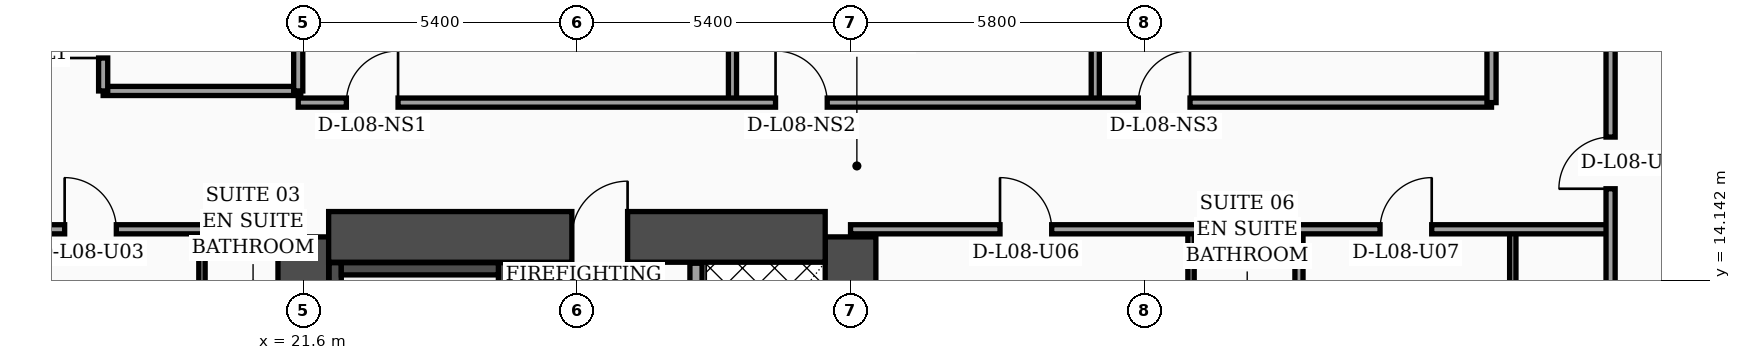
"""IFC4 building model, lengths in metres.
Left out: names, types, materials, properties, quantities, classifications, styles, units other than length and angle.
Written with IfcOpenShell. Run it as: python <this file> out.ifc"""

import sys

from ifc_helpers import new_model, si_unit, direction, frame, frame_2d, origin, place, context, subcontext, project, spatial, rectangle, extrude, element, fill, save


model = new_model("IFC4")
c1 = context("Model", 3, precision=1e-05, world=origin(), true_north=direction((0.0, 1.0)))
c2 = subcontext(c1, "Body", "Model", "MODEL_VIEW")
j1 = project(units=[si_unit("LENGTHUNIT", "METRE"), si_unit("PLANEANGLEUNIT", "RADIAN")], contexts=[c1])
p1 = place(None, origin())
s1 = spatial("IfcSite", under=j1, at=p1, CompositionType="ELEMENT")
p2 = place(p1, origin())
s2 = spatial("IfcBuilding", under=s1, at=p2, CompositionType="ELEMENT")
p3 = place(p2, frame((0.0, 0.0, 38.4)))
s3 = spatial("IfcBuildingStorey", under=s2, at=p3, CompositionType="ELEMENT", Elevation=38.4)
for number, where, z_axis, x_axis in (
    (1, (21.6, 4.6, 0.0), (0.0, 0.0, 1.0), (0.0, 1.0, 0.0)),
    (2, (32.4, 4.6, 0.0), (0.0, 0.0, 1.0), (0.0, 1.0, 0.0)),
):
    element("IfcWall", number, at=place(p3, frame(where, z_axis=z_axis, x_axis=x_axis)), inside=s3, PredefinedType="SHEAR", context=c2, shape_type="SweptSolid", body=[
        extrude(rectangle(XDim=10.4, YDim=1.0, at=frame_2d((5.2, 0.0))), origin(), (0.0, 0.0, 1.0), 3.56),
    ])
p4 = place(p3, frame((22.1, 15.0, 0.0), z_axis=(0.0, 0.0, 1.0), x_axis=(1.0, 0.0, 0.0)))
e3 = element("IfcWall", 3, at=p4, inside=s3, PredefinedType="SHEAR", context=c2, shape_type="SweptSolid", body=[
    extrude(rectangle(XDim=9.8, YDim=1.0, at=frame_2d((4.9, 0.0))), origin(), (0.0, 0.0, 1.0), 3.56),
])
p5 = place(p4, frame((4.8, 0.0, 0.0)))
e4 = element("IfcOpeningElement", 4, at=p5, cuts=e3, PredefinedType="OPENING", context=c2, shape_type="SweptSolid", body=[
    extrude(rectangle(XDim=1.1, YDim=2.2, at=frame_2d((0.55, 1.1))), frame((0.0, 0.51, 0.0), z_axis=(0.0, -1.0, 0.0), x_axis=(1.0, 0.0, 0.0)), (0.0, 0.0, 1.0), 1.02),
])
p6 = place(p3, frame((22.23, 5.1, 0.0), z_axis=(0.0, 0.0, 1.0), x_axis=(0.0, 1.0, 0.0)))
e5 = element("IfcWall", 5, at=p6, inside=s3, PredefinedType="SOLIDWALL", context=c2, shape_type="SweptSolid", body=[
    extrude(rectangle(XDim=9.39, YDim=0.24, at=frame_2d((4.695, 0.0))), origin(), (0.0, 0.0, 1.0), 3.56),
])
p7 = place(p3, frame((25.57, 5.1, 0.0), z_axis=(0.0, 0.0, 1.0), x_axis=(0.0, 1.0, 0.0)))
e6 = element("IfcWall", 6, at=p7, inside=s3, PredefinedType="SOLIDWALL", context=c2, shape_type="SweptSolid", body=[
    extrude(rectangle(XDim=9.39, YDim=0.24, at=frame_2d((4.695, 0.0))), origin(), (0.0, 0.0, 1.0), 3.56),
])
p8 = place(p7, frame((0.35, 0.0, 0.0)))
e7 = element("IfcOpeningElement", 7, at=p8, cuts=e6, PredefinedType="OPENING", context=c2, shape_type="SweptSolid", body=[
    extrude(rectangle(XDim=1.15, YDim=2.2, at=frame_2d((0.575, 1.1))), frame((0.0, 0.13, 0.0), z_axis=(0.0, -1.0, 0.0), x_axis=(1.0, 0.0, 0.0)), (0.0, 0.0, 1.0), 0.26),
])
p9 = place(p3, frame((22.35, 14.37, 0.0), z_axis=(0.0, 0.0, 1.0), x_axis=(1.0, 0.0, 0.0)))
e8 = element("IfcWall", 8, at=p9, inside=s3, PredefinedType="SOLIDWALL", context=c2, shape_type="SweptSolid", body=[
    extrude(rectangle(XDim=3.1, YDim=0.24, at=frame_2d((1.55, 0.0))), origin(), (0.0, 0.0, 1.0), 3.56),
])
p10 = place(p3, frame((29.35, 5.12, 0.0), z_axis=(0.0, 0.0, 1.0), x_axis=(0.0, 1.0, 0.0)))
e9 = element("IfcWall", 9, at=p10, inside=s3, PredefinedType="SOLIDWALL", context=c2, shape_type="SweptSolid", body=[
    extrude(rectangle(XDim=9.36, YDim=0.24, at=frame_2d((4.68, 0.0))), origin(), (0.0, 0.0, 1.0), 3.56),
])
p11 = place(p10, frame((0.55, 0.0, 0.0)))
e10 = element("IfcOpeningElement", 10, at=p11, cuts=e9, PredefinedType="OPENING", context=c2, shape_type="SweptSolid", body=[
    extrude(rectangle(XDim=1.3, YDim=2.35, at=frame_2d((0.65, 1.175))), frame((0.0, 0.13, 0.0), z_axis=(0.0, -1.0, 0.0), x_axis=(1.0, 0.0, 0.0)), (0.0, 0.0, 1.0), 0.26),
])
p12 = place(p3, frame((19.6, 2.44, 0.0), z_axis=(0.0, 0.0, 1.0), x_axis=(0.0, 1.0, 0.0)))
e11 = element("IfcWall", 11, at=p12, inside=s3, PredefinedType="PARTITIONING", context=c2, shape_type="SweptSolid", body=[
    extrude(rectangle(XDim=12.71, YDim=0.125, at=frame_2d((6.355, 0.0))), origin(), (0.0, 0.0, 1.0), 2.34),
])
p13 = place(p12, frame((4.34, 0.0, 0.0)))
e12 = element("IfcOpeningElement", 12, at=p13, cuts=e11, PredefinedType="OPENING", context=c2, shape_type="SweptSolid", body=[
    extrude(rectangle(XDim=0.96, YDim=2.2, at=frame_2d((0.48, 1.1))), frame((0.0, 0.073, 0.0), z_axis=(0.0, -1.0, 0.0), x_axis=(1.0, 0.0, 0.0)), (0.0, 0.0, 1.0), 0.145),
])
p14 = place(p12, frame((10.18, 0.0, 0.0)))
e13 = element("IfcOpeningElement", 13, at=p14, cuts=e11, PredefinedType="OPENING", context=c2, shape_type="SweptSolid", body=[
    extrude(rectangle(XDim=0.9, YDim=2.15, at=frame_2d((0.45, 1.075))), frame((0.0, 0.073, 0.0), z_axis=(0.0, -1.0, 0.0), x_axis=(1.0, 0.0, 0.0)), (0.0, 0.0, 1.0), 0.145),
])
p15 = place(p3, frame((15.15, 15.15, 0.0), z_axis=(0.0, 0.0, 1.0), x_axis=(1.0, 0.0, 0.0)))
e14 = element("IfcWall", 14, at=p15, inside=s3, PredefinedType="PARTITIONING", context=c2, shape_type="SweptSolid", body=[
    extrude(rectangle(XDim=6.45, YDim=0.18, at=frame_2d((3.225, 0.0))), origin(), (0.0, 0.0, 1.0), 2.34),
])
p16 = place(p15, frame((1.74, 0.0, 0.0)))
e15 = element("IfcOpeningElement", 15, at=p16, cuts=e14, PredefinedType="OPENING", context=c2, shape_type="SweptSolid", body=[
    extrude(rectangle(XDim=1.02, YDim=2.2, at=frame_2d((0.51, 1.1))), frame((0.0, 0.1, 0.0), z_axis=(0.0, -1.0, 0.0), x_axis=(1.0, 0.0, 0.0)), (0.0, 0.0, 1.0), 0.2),
])
p17 = place(p3, frame((17.65, 17.88, 0.0), z_axis=(0.0, 0.0, 1.0), x_axis=(1.0, 0.0, 0.0)))
e16 = element("IfcWall", 16, at=p17, inside=s3, PredefinedType="PARTITIONING", context=c2, shape_type="SweptSolid", body=[
    extrude(rectangle(XDim=3.9, YDim=0.18, at=frame_2d((1.95, 0.0))), origin(), (0.0, 0.0, 1.0), 3.56),
])
p18 = place(p3, frame((21.5, 17.88, 0.0), z_axis=(0.0, 0.0, 1.0), x_axis=(0.0, 1.0, 0.0)))
e17 = element("IfcWall", 17, at=p18, inside=s3, PredefinedType="PARTITIONING", context=c2, shape_type="SweptSolid", body=[
    extrude(rectangle(XDim=6.44, YDim=0.18, at=frame_2d((3.22, 0.0))), origin(), (0.0, 0.0, 1.0), 3.09),
])
p19 = place(p3, frame((17.65, 17.88, 0.0), z_axis=(0.0, 0.0, 1.0), x_axis=(0.0, 1.0, 0.0)))
e18 = element("IfcWall", 18, at=p19, inside=s3, PredefinedType="PARTITIONING", context=c2, shape_type="SweptSolid", body=[
    extrude(rectangle(XDim=6.44, YDim=0.18, at=frame_2d((3.22, 0.0))), origin(), (0.0, 0.0, 1.0), 3.09),
])
p20 = place(p19, frame((0.65, 0.0, 0.0)))
e19 = element("IfcOpeningElement", 19, at=p20, cuts=e18, PredefinedType="OPENING", context=c2, shape_type="SweptSolid", body=[
    extrude(rectangle(XDim=0.98, YDim=2.15, at=frame_2d((0.49, 1.075))), frame((0.0, 0.1, 0.0), z_axis=(0.0, -1.0, 0.0), x_axis=(1.0, 0.0, 0.0)), (0.0, 0.0, 1.0), 0.2),
])
p21 = place(p19, frame((3.97, 0.0, 0.0)))
e20 = element("IfcOpeningElement", 20, at=p21, cuts=e18, PredefinedType="OPENING", context=c2, shape_type="SweptSolid", body=[
    extrude(rectangle(XDim=0.96, YDim=2.2, at=frame_2d((0.48, 1.1))), frame((0.0, 0.1, 0.0), z_axis=(0.0, -1.0, 0.0), x_axis=(1.0, 0.0, 0.0)), (0.0, 0.0, 1.0), 0.2),
])
p22 = place(p3, frame((39.12, 2.44, 0.0), z_axis=(0.0, 0.0, 1.0), x_axis=(0.0, 1.0, 0.0)))
e21 = element("IfcWall", 21, at=p22, inside=s3, PredefinedType="PARTITIONING", context=c2, shape_type="SweptSolid", body=[
    extrude(rectangle(XDim=12.71, YDim=0.125, at=frame_2d((6.355, 0.0))), origin(), (0.0, 0.0, 1.0), 2.84),
])
p23 = place(p22, frame((4.35, 0.0, 0.0)))
e22 = element("IfcOpeningElement", 22, at=p23, cuts=e21, PredefinedType="OPENING", context=c2, shape_type="SweptSolid", body=[
    extrude(rectangle(XDim=0.96, YDim=2.2, at=frame_2d((0.48, 1.1))), frame((0.0, 0.073, 0.0), z_axis=(0.0, -1.0, 0.0), x_axis=(1.0, 0.0, 0.0)), (0.0, 0.0, 1.0), 0.145),
])
p24 = place(p22, frame((10.21, 0.0, 0.0)))
e23 = element("IfcOpeningElement", 23, at=p24, cuts=e21, PredefinedType="OPENING", context=c2, shape_type="SweptSolid", body=[
    extrude(rectangle(XDim=0.9, YDim=2.15, at=frame_2d((0.45, 1.075))), frame((0.0, 0.073, 0.0), z_axis=(0.0, -1.0, 0.0), x_axis=(1.0, 0.0, 0.0)), (0.0, 0.0, 1.0), 0.145),
])
p25 = place(p3, frame((45.47, 2.44, 0.0), z_axis=(0.0, 0.0, 1.0), x_axis=(0.0, 1.0, 0.0)))
e24 = element("IfcWall", 24, at=p25, inside=s3, PredefinedType="PARTITIONING", context=c2, shape_type="SweptSolid", body=[
    extrude(rectangle(XDim=12.71, YDim=0.125, at=frame_2d((6.355, 0.0))), origin(), (0.0, 0.0, 1.0), 3.04),
])
p26 = place(p25, frame((4.35, 0.0, 0.0)))
e25 = element("IfcOpeningElement", 25, at=p26, cuts=e24, PredefinedType="OPENING", context=c2, shape_type="SweptSolid", body=[
    extrude(rectangle(XDim=0.96, YDim=2.2, at=frame_2d((0.48, 1.1))), frame((0.0, 0.073, 0.0), z_axis=(0.0, -1.0, 0.0), x_axis=(1.0, 0.0, 0.0)), (0.0, 0.0, 1.0), 0.145),
])
p27 = place(p25, frame((10.21, 0.0, 0.0)))
e26 = element("IfcOpeningElement", 26, at=p27, cuts=e24, PredefinedType="OPENING", context=c2, shape_type="SweptSolid", body=[
    extrude(rectangle(XDim=0.9, YDim=2.15, at=frame_2d((0.45, 1.075))), frame((0.0, 0.073, 0.0), z_axis=(0.0, -1.0, 0.0), x_axis=(1.0, 0.0, 0.0)), (0.0, 0.0, 1.0), 0.145),
])
p28 = place(p3, frame((41.25, 2.44, 0.0), z_axis=(0.0, 0.0, 1.0), x_axis=(0.0, 1.0, 0.0)))
e27 = element("IfcWall", 27, at=p28, inside=s3, PredefinedType="PARTITIONING", context=c2, shape_type="SweptSolid", body=[
    extrude(rectangle(XDim=12.71, YDim=0.16, at=frame_2d((6.355, 0.0))), origin(), (0.0, 0.0, 1.0), 3.04),
])
p29 = place(p3, frame((32.4, 15.15, 0.0), z_axis=(0.0, 0.0, 1.0), x_axis=(1.0, 0.0, 0.0)))
e28 = element("IfcWall", 28, at=p29, inside=s3, PredefinedType="PARTITIONING", context=c2, shape_type="SweptSolid", body=[
    extrude(rectangle(XDim=15.0, YDim=0.18, at=frame_2d((7.5, 0.0))), origin(), (0.0, 0.0, 1.0), 2.84),
])
p30 = place(p29, frame((2.95, 0.0, 0.0)))
e29 = element("IfcOpeningElement", 29, at=p30, cuts=e28, PredefinedType="OPENING", context=c2, shape_type="SweptSolid", body=[
    extrude(rectangle(XDim=1.02, YDim=2.2, at=frame_2d((0.51, 1.1))), frame((0.0, 0.1, 0.0), z_axis=(0.0, -1.0, 0.0), x_axis=(1.0, 0.0, 0.0)), (0.0, 0.0, 1.0), 0.2),
])
p31 = place(p29, frame((10.45, 0.0, 0.0)))
e30 = element("IfcOpeningElement", 30, at=p31, cuts=e28, PredefinedType="OPENING", context=c2, shape_type="SweptSolid", body=[
    extrude(rectangle(XDim=1.02, YDim=2.2, at=frame_2d((0.51, 1.1))), frame((0.0, 0.1, 0.0), z_axis=(0.0, -1.0, 0.0), x_axis=(1.0, 0.0, 0.0)), (0.0, 0.0, 1.0), 0.2),
])
p32 = place(p3, frame((30.07, 17.65, 0.0), z_axis=(0.0, 0.0, 1.0), x_axis=(0.0, 1.0, 0.0)))
e31 = element("IfcWall", 31, at=p32, inside=s3, PredefinedType="PARTITIONING", context=c2, shape_type="SweptSolid", body=[
    extrude(rectangle(XDim=10.83, YDim=0.16, at=frame_2d((5.415, 0.0))), origin(), (0.0, 0.0, 1.0), 2.84),
])
p33 = place(p3, frame((37.23, 17.65, 0.0), z_axis=(0.0, 0.0, 1.0), x_axis=(0.0, 1.0, 0.0)))
e32 = element("IfcWall", 32, at=p33, inside=s3, PredefinedType="PARTITIONING", context=c2, shape_type="SweptSolid", body=[
    extrude(rectangle(XDim=14.21, YDim=0.16, at=frame_2d((7.105, 0.0))), origin(), (0.0, 0.0, 1.0), 2.84),
])
p34 = place(p3, frame((21.5, 17.65, 0.0), z_axis=(0.0, 0.0, 1.0), x_axis=(1.0, 0.0, 0.0)))
e33 = element("IfcWall", 33, at=p34, inside=s3, PredefinedType="PARTITIONING", context=c2, shape_type="SweptSolid", body=[
    extrude(rectangle(XDim=23.55, YDim=0.18, at=frame_2d((11.775, 0.0))), origin(), (0.0, 0.0, 1.0), 2.84),
])
p35 = place(p34, frame((0.95, 0.0, 0.0)))
e34 = element("IfcOpeningElement", 34, at=p35, cuts=e33, PredefinedType="OPENING", context=c2, shape_type="SweptSolid", body=[
    extrude(rectangle(XDim=1.02, YDim=2.2, at=frame_2d((0.51, 1.1))), frame((0.0, 0.1, 0.0), z_axis=(0.0, -1.0, 0.0), x_axis=(1.0, 0.0, 0.0)), (0.0, 0.0, 1.0), 0.2),
])
p36 = place(p34, frame((9.42, 0.0, 0.0)))
e35 = element("IfcOpeningElement", 35, at=p36, cuts=e33, PredefinedType="OPENING", context=c2, shape_type="SweptSolid", body=[
    extrude(rectangle(XDim=1.02, YDim=2.2, at=frame_2d((0.51, 1.1))), frame((0.0, 0.1, 0.0), z_axis=(0.0, -1.0, 0.0), x_axis=(1.0, 0.0, 0.0)), (0.0, 0.0, 1.0), 0.2),
])
p37 = place(p34, frame((16.58, 0.0, 0.0)))
e36 = element("IfcOpeningElement", 36, at=p37, cuts=e33, PredefinedType="OPENING", context=c2, shape_type="SweptSolid", body=[
    extrude(rectangle(XDim=1.02, YDim=2.2, at=frame_2d((0.51, 1.1))), frame((0.0, 0.1, 0.0), z_axis=(0.0, -1.0, 0.0), x_axis=(1.0, 0.0, 0.0)), (0.0, 0.0, 1.0), 0.2),
])
p38 = place(p3, frame((45.05, 17.65, 0.0), z_axis=(0.0, 0.0, 1.0), x_axis=(0.0, 1.0, 0.0)))
e37 = element("IfcWall", 37, at=p38, inside=s3, PredefinedType="PARTITIONING", context=c2, shape_type="SweptSolid", body=[
    extrude(rectangle(XDim=17.9, YDim=0.18, at=frame_2d((8.95, 0.0))), origin(), (0.0, 0.0, 1.0), 2.84),
])
p39 = place(p3, frame((47.4, 2.44, 0.0), z_axis=(0.0, 0.0, 1.0), x_axis=(0.0, 1.0, 0.0)))
e38 = element("IfcWall", 38, at=p39, inside=s3, PredefinedType="PARTITIONING", context=c2, shape_type="SweptSolid", body=[
    extrude(rectangle(XDim=27.84, YDim=0.18, at=frame_2d((13.92, 0.0))), origin(), (0.0, 0.0, 1.0), 2.84),
])
p40 = place(p39, frame((13.51, 0.0, 0.0)))
e39 = element("IfcOpeningElement", 39, at=p40, cuts=e38, PredefinedType="OPENING", context=c2, shape_type="SweptSolid", body=[
    extrude(rectangle(XDim=1.02, YDim=2.2, at=frame_2d((0.51, 1.1))), frame((0.0, 0.1, 0.0), z_axis=(0.0, -1.0, 0.0), x_axis=(1.0, 0.0, 0.0)), (0.0, 0.0, 1.0), 0.2),
])
p41 = place(p39, frame((21.52, 0.0, 0.0)))
e40 = element("IfcOpeningElement", 40, at=p41, cuts=e38, PredefinedType="OPENING", context=c2, shape_type="SweptSolid", body=[
    extrude(rectangle(XDim=1.02, YDim=2.2, at=frame_2d((0.51, 1.1))), frame((0.0, 0.1, 0.0), z_axis=(0.0, -1.0, 0.0), x_axis=(1.0, 0.0, 0.0)), (0.0, 0.0, 1.0), 0.2),
])
p42 = place(p16, origin())
e41 = element("IfcDoor", 41, at=p42, inside=s3, OperationType="SINGLE_SWING_LEFT", PredefinedType="DOOR", context=c2, shape_type="SweptSolid", body=[
    extrude(rectangle(XDim=1.02, YDim=2.2, at=frame_2d((0.51, 1.1))), frame((0.0, 0.025, 0.0), z_axis=(0.0, -1.0, 0.0), x_axis=(1.0, 0.0, 0.0)), (0.0, 0.0, 1.0), 0.05),
])
fill(e15, e41)
p43 = place(p20, origin())
e42 = element("IfcDoor", 42, at=p43, inside=s3, OperationType="SINGLE_SWING_LEFT", PredefinedType="DOOR", context=c2, shape_type="SweptSolid", body=[
    extrude(rectangle(XDim=0.98, YDim=2.15, at=frame_2d((0.49, 1.075))), frame((0.0, 0.025, 0.0), z_axis=(0.0, -1.0, 0.0), x_axis=(1.0, 0.0, 0.0)), (0.0, 0.0, 1.0), 0.05),
])
fill(e19, e42)
p44 = place(p30, origin())
e43 = element("IfcDoor", 43, at=p44, inside=s3, OperationType="SINGLE_SWING_LEFT", PredefinedType="DOOR", context=c2, shape_type="SweptSolid", body=[
    extrude(rectangle(XDim=1.02, YDim=2.2, at=frame_2d((0.51, 1.1))), frame((0.0, 0.025, 0.0), z_axis=(0.0, -1.0, 0.0), x_axis=(1.0, 0.0, 0.0)), (0.0, 0.0, 1.0), 0.05),
])
fill(e29, e43)
p45 = place(p31, origin())
e44 = element("IfcDoor", 44, at=p45, inside=s3, OperationType="SINGLE_SWING_RIGHT", PredefinedType="DOOR", context=c2, shape_type="SweptSolid", body=[
    extrude(rectangle(XDim=1.02, YDim=2.2, at=frame_2d((0.51, 1.1))), frame((0.0, 0.025, 0.0), z_axis=(0.0, -1.0, 0.0), x_axis=(1.0, 0.0, 0.0)), (0.0, 0.0, 1.0), 0.05),
])
fill(e30, e44)
p46 = place(p35, origin())
e45 = element("IfcDoor", 45, at=p46, inside=s3, OperationType="SINGLE_SWING_RIGHT", PredefinedType="DOOR", context=c2, shape_type="SweptSolid", body=[
    extrude(rectangle(XDim=1.02, YDim=2.2, at=frame_2d((0.51, 1.1))), frame((0.0, 0.025, 0.0), z_axis=(0.0, -1.0, 0.0), x_axis=(1.0, 0.0, 0.0)), (0.0, 0.0, 1.0), 0.05),
])
fill(e34, e45)
p47 = place(p36, origin())
e46 = element("IfcDoor", 46, at=p47, inside=s3, OperationType="SINGLE_SWING_LEFT", PredefinedType="DOOR", context=c2, shape_type="SweptSolid", body=[
    extrude(rectangle(XDim=1.02, YDim=2.2, at=frame_2d((0.51, 1.1))), frame((0.0, 0.025, 0.0), z_axis=(0.0, -1.0, 0.0), x_axis=(1.0, 0.0, 0.0)), (0.0, 0.0, 1.0), 0.05),
])
fill(e35, e46)
p48 = place(p37, origin())
e47 = element("IfcDoor", 47, at=p48, inside=s3, OperationType="SINGLE_SWING_RIGHT", PredefinedType="DOOR", context=c2, shape_type="SweptSolid", body=[
    extrude(rectangle(XDim=1.02, YDim=2.2, at=frame_2d((0.51, 1.1))), frame((0.0, 0.025, 0.0), z_axis=(0.0, -1.0, 0.0), x_axis=(1.0, 0.0, 0.0)), (0.0, 0.0, 1.0), 0.05),
])
fill(e36, e47)
p49 = place(p40, origin())
e48 = element("IfcDoor", 48, at=p49, inside=s3, OperationType="SINGLE_SWING_LEFT", PredefinedType="DOOR", context=c2, shape_type="SweptSolid", body=[
    extrude(rectangle(XDim=1.02, YDim=2.2, at=frame_2d((0.51, 1.1))), frame((0.0, 0.025, 0.0), z_axis=(0.0, -1.0, 0.0), x_axis=(1.0, 0.0, 0.0)), (0.0, 0.0, 1.0), 0.05),
])
fill(e39, e48)
p50 = place(p5, origin())
e49 = element("IfcDoor", 49, at=p50, inside=s3, OperationType="SINGLE_SWING_RIGHT", PredefinedType="DOOR", context=c2, shape_type="SweptSolid", body=[
    extrude(rectangle(XDim=1.1, YDim=2.2, at=frame_2d((0.55, 1.1))), frame((0.0, 0.025, 0.0), z_axis=(0.0, -1.0, 0.0), x_axis=(1.0, 0.0, 0.0)), (0.0, 0.0, 1.0), 0.05),
])
fill(e4, e49)
save(model, sys.argv[1])
